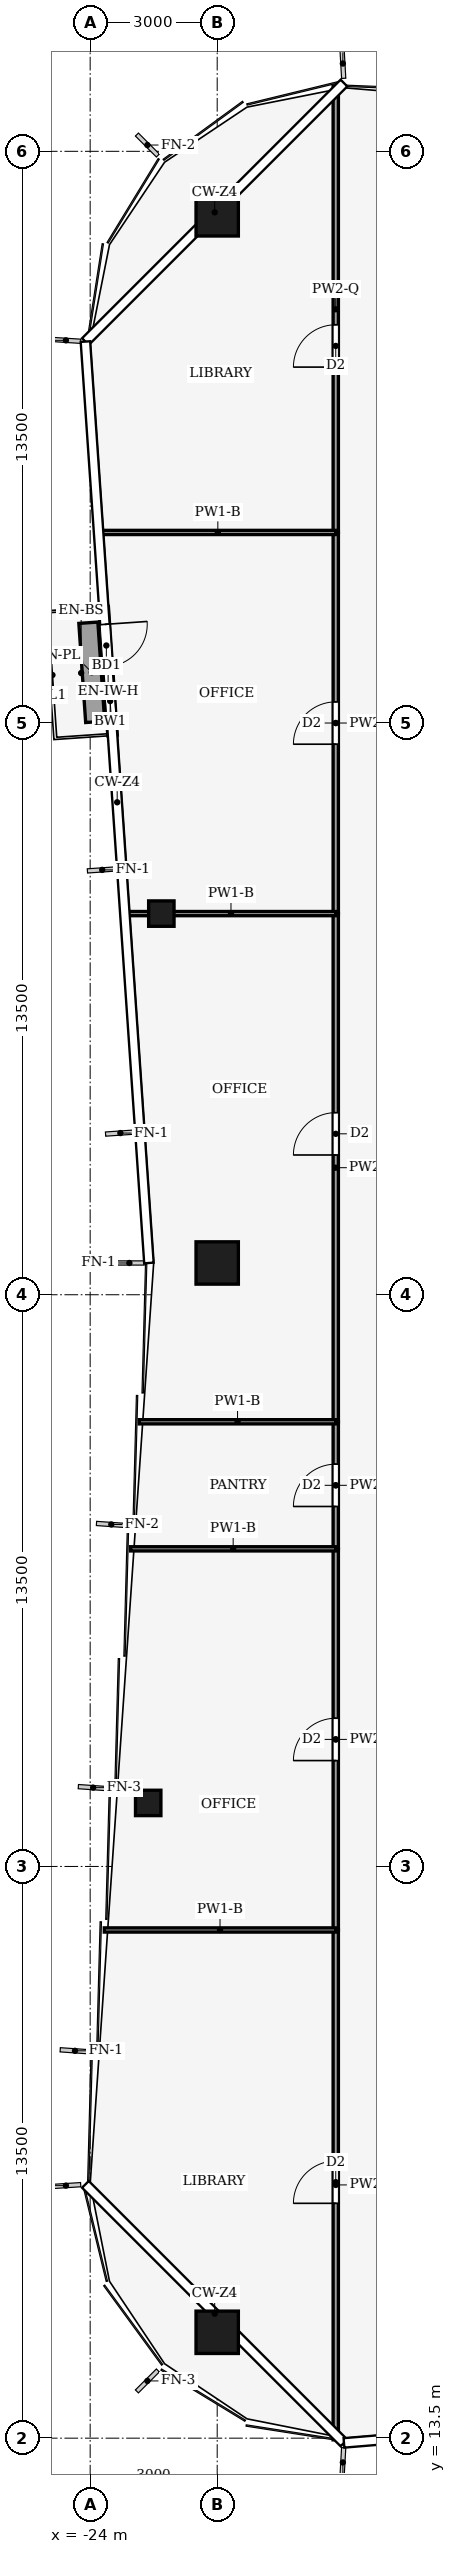
"""IFC4 building model, lengths in metres.
Left out: names, types, materials, properties, quantities, classifications, styles, units other than length and angle.
Written with IfcOpenShell. Run it as: python <this file> out.ifc"""

import sys

from ifc_helpers import new_model, si_unit, direction, frame, frame_2d, origin, origin_2d, place, context, subcontext, project, spatial, rectangle, hollow_rectangle, extrude, element, fill, save


model = new_model("IFC4")
c1 = context("Model", 3, precision=1e-05, world=origin(), true_north=direction((0.0, 1.0)))
c2 = subcontext(c1, "Body", "Model", "MODEL_VIEW")
j1 = project(units=[si_unit("LENGTHUNIT", "METRE"), si_unit("PLANEANGLEUNIT", "RADIAN")], contexts=[c1])
p1 = place(None, origin())
s1 = spatial("IfcSite", under=j1, at=p1, CompositionType="ELEMENT")
p2 = place(p1, origin())
s2 = spatial("IfcBuilding", under=s1, at=p2, CompositionType="ELEMENT")
p3 = place(p2, frame((0.0, 0.0, 233.0)))
s3 = spatial("IfcBuildingStorey", under=s2, at=p3, CompositionType="ELEMENT", Elevation=233.0)
for number, where, z_axis, x_axis in (
    (1, (-21.0, 66.0, 0.0), (0.0, 0.0, 1.0), (1.0, 0.0, 0.0)),
    (2, (-21.0, 16.0, 0.0), (0.0, 0.0, 1.0), (1.0, 0.0, 0.0)),
    (3, (-21.0, 41.25, 0.0), (0.0, 0.0, 1.0), (1.0, 0.0, 0.0)),
):
    element("IfcColumn", number, at=place(p3, frame(where, z_axis=z_axis, x_axis=x_axis)), inside=s3, PredefinedType="COLUMN", context=c2, shape_type="SweptSolid", body=[
        extrude(hollow_rectangle(XDim=1.0, YDim=1.0, WallThickness=0.045, at=origin_2d()), origin(), (0.0, 0.0, 1.0), 5.0),
    ])
for number, where, z_axis, x_axis in (
    (4, (-22.629, 28.5, 0.0), (0.0, 0.0, 1.0), (1.0, 0.0, 0.0)),
    (5, (-22.319, 49.5, 0.0), (0.0, 0.0, 1.0), (1.0, 0.0, 0.0)),
):
    element("IfcColumn", number, at=place(p3, frame(where, z_axis=z_axis, x_axis=x_axis)), inside=s3, PredefinedType="COLUMN", context=c2, shape_type="SweptSolid", body=[
        extrude(hollow_rectangle(XDim=0.6, YDim=0.6, WallThickness=0.025, at=origin_2d()), origin(), (0.0, 0.0, 1.0), 5.0),
    ])
p4 = place(p3, frame((-23.681, 56.744, 0.0), z_axis=(0.0, 0.0, 1.0), x_axis=(0.068837845086, -0.997627862023, 0.0)))
e6 = element("IfcWall", 6, at=p4, inside=s3, PredefinedType="SOLIDWALL", context=c2, shape_type="SweptSolid", body=[
    extrude(rectangle(XDim=3.047, YDim=0.224, at=frame_2d((1.523, 0.0))), origin(), (0.0, 0.0, 1.0), 4.65),
])
p5 = place(p4, frame((0.416, 0.0, 0.0)))
e7 = element("IfcOpeningElement", 7, at=p5, cuts=e6, PredefinedType="OPENING", context=c2, shape_type="SweptSolid", body=[
    extrude(rectangle(XDim=1.0, YDim=2.1, at=frame_2d((0.5, 1.05))), frame((0.0, 0.122, 0.0), z_axis=(0.0, -1.0, 0.0), x_axis=(1.0, 0.0, 0.0)), (0.0, 0.0, 1.0), 0.244),
])
p6 = place(p4, frame((1.831, 0.0, 0.9)))
e8 = element("IfcOpeningElement", 8, at=p6, cuts=e6, PredefinedType="OPENING", context=c2, shape_type="SweptSolid", body=[
    extrude(rectangle(XDim=0.8, YDim=1.2, at=frame_2d((0.4, 0.6))), frame((0.0, 0.122, 0.0), z_axis=(0.0, -1.0, 0.0), x_axis=(1.0, 0.0, 0.0)), (0.0, 0.0, 1.0), 0.244),
])
p7 = place(p3, frame((-24.043, 56.368, 0.0), z_axis=(0.0, 0.0, 1.0), x_axis=(0.068769956374, -0.997632544127, 0.0)))
e9 = element("IfcWall", 9, at=p7, inside=s3, PredefinedType="USERDEFINED", context=c2, shape_type="SweptSolid", body=[
    extrude(rectangle(XDim=2.347, YDim=0.45, at=frame_2d((1.173, 0.0))), origin(), (0.0, 0.0, 1.0), 0.4),
])
p8 = place(p3, frame((-18.2, 13.46, 0.0), z_axis=(0.0, 0.0, 1.0), x_axis=(0.0, 1.0, 0.0)))
e10 = element("IfcWall", 10, at=p8, inside=s3, PredefinedType="PARTITIONING", context=c2, shape_type="SweptSolid", body=[
    extrude(rectangle(XDim=12.04, YDim=0.125, at=frame_2d((6.02, 0.0))), origin(), (0.0, 0.0, 1.0), 3.93),
])
p9 = place(p8, frame((5.586, 0.0, 0.0)))
e11 = element("IfcOpeningElement", 11, at=p9, cuts=e10, PredefinedType="OPENING", context=c2, shape_type="SweptSolid", body=[
    extrude(rectangle(XDim=1.0, YDim=2.1, at=frame_2d((0.5, 1.05))), frame((0.0, 0.073, 0.0), z_axis=(0.0, -1.0, 0.0), x_axis=(1.0, 0.0, 0.0)), (0.0, 0.0, 1.0), 0.145),
])
p10 = place(p3, frame((-18.2, 25.5, 0.0), z_axis=(0.0, 0.0, 1.0), x_axis=(0.0, 1.0, 0.0)))
e12 = element("IfcWall", 12, at=p10, inside=s3, PredefinedType="PARTITIONING", context=c2, shape_type="SweptSolid", body=[
    extrude(rectangle(XDim=9.0, YDim=0.125, at=frame_2d((4.5, 0.0))), origin(), (0.0, 0.0, 1.0), 4.48),
])
p11 = place(p10, frame((4.0, 0.0, 0.0)))
e13 = element("IfcOpeningElement", 13, at=p11, cuts=e12, PredefinedType="OPENING", context=c2, shape_type="SweptSolid", body=[
    extrude(rectangle(XDim=1.0, YDim=2.1, at=frame_2d((0.5, 1.05))), frame((0.0, 0.073, 0.0), z_axis=(0.0, -1.0, 0.0), x_axis=(1.0, 0.0, 0.0)), (0.0, 0.0, 1.0), 0.145),
])
p12 = place(p3, frame((-18.2, 34.5, 0.0), z_axis=(0.0, 0.0, 1.0), x_axis=(0.0, 1.0, 0.0)))
e14 = element("IfcWall", 14, at=p12, inside=s3, PredefinedType="PARTITIONING", context=c2, shape_type="SweptSolid", body=[
    extrude(rectangle(XDim=3.0, YDim=0.125, at=frame_2d((1.5, 0.0))), origin(), (0.0, 0.0, 1.0), 4.48),
])
p13 = place(p12, frame((1.0, 0.0, 0.0)))
e15 = element("IfcOpeningElement", 15, at=p13, cuts=e14, PredefinedType="OPENING", context=c2, shape_type="SweptSolid", body=[
    extrude(rectangle(XDim=1.0, YDim=2.1, at=frame_2d((0.5, 1.05))), frame((0.0, 0.073, 0.0), z_axis=(0.0, -1.0, 0.0), x_axis=(1.0, 0.0, 0.0)), (0.0, 0.0, 1.0), 0.145),
])
p14 = place(p3, frame((-18.2, 37.5, 0.0), z_axis=(0.0, 0.0, 1.0), x_axis=(0.0, 1.0, 0.0)))
e16 = element("IfcWall", 16, at=p14, inside=s3, PredefinedType="PARTITIONING", context=c2, shape_type="SweptSolid", body=[
    extrude(rectangle(XDim=12.0, YDim=0.125, at=frame_2d((6.0, 0.0))), origin(), (0.0, 0.0, 1.0), 4.14),
])
p15 = place(p14, frame((6.3, 0.0, 0.0)))
e17 = element("IfcOpeningElement", 17, at=p15, cuts=e16, PredefinedType="OPENING", context=c2, shape_type="SweptSolid", body=[
    extrude(rectangle(XDim=1.0, YDim=2.1, at=frame_2d((0.5, 1.05))), frame((0.0, 0.073, 0.0), z_axis=(0.0, -1.0, 0.0), x_axis=(1.0, 0.0, 0.0)), (0.0, 0.0, 1.0), 0.145),
])
p16 = place(p3, frame((-18.2, 49.5, 0.0), z_axis=(0.0, 0.0, 1.0), x_axis=(0.0, 1.0, 0.0)))
e18 = element("IfcWall", 18, at=p16, inside=s3, PredefinedType="PARTITIONING", context=c2, shape_type="SweptSolid", body=[
    extrude(rectangle(XDim=9.0, YDim=0.125, at=frame_2d((4.5, 0.0))), origin(), (0.0, 0.0, 1.0), 4.24),
])
p17 = place(p16, frame((4.0, 0.0, 0.0)))
e19 = element("IfcOpeningElement", 19, at=p17, cuts=e18, PredefinedType="OPENING", context=c2, shape_type="SweptSolid", body=[
    extrude(rectangle(XDim=1.0, YDim=2.1, at=frame_2d((0.5, 1.05))), frame((0.0, 0.073, 0.0), z_axis=(0.0, -1.0, 0.0), x_axis=(1.0, 0.0, 0.0)), (0.0, 0.0, 1.0), 0.145),
])
p18 = place(p3, frame((-18.2, 58.5, 0.0), z_axis=(0.0, 0.0, 1.0), x_axis=(0.0, 1.0, 0.0)))
e20 = element("IfcWall", 20, at=p18, inside=s3, PredefinedType="PARTITIONING", context=c2, shape_type="SweptSolid", body=[
    extrude(rectangle(XDim=10.54, YDim=0.125, at=frame_2d((5.27, 0.0))), origin(), (0.0, 0.0, 1.0), 3.93),
])
p19 = place(p18, frame((3.905, 0.0, 0.0)))
e21 = element("IfcOpeningElement", 21, at=p19, cuts=e20, PredefinedType="OPENING", context=c2, shape_type="SweptSolid", body=[
    extrude(rectangle(XDim=1.0, YDim=2.1, at=frame_2d((0.5, 1.05))), frame((0.0, 0.073, 0.0), z_axis=(0.0, -1.0, 0.0), x_axis=(1.0, 0.0, 0.0)), (0.0, 0.0, 1.0), 0.145),
])
p20 = place(p3, frame((-18.2, 25.5, 0.0), z_axis=(0.0, 0.0, 1.0), x_axis=(-1.0, 0.0, 0.0)))
e22 = element("IfcWall", 22, at=p20, inside=s3, PredefinedType="PARTITIONING", context=c2, shape_type="SweptSolid", body=[
    extrude(rectangle(XDim=5.466, YDim=0.1, at=frame_2d((2.733, 0.0))), origin(), (0.0, 0.0, 1.0), 4.04),
])
p21 = place(p3, frame((-18.2, 34.5, 0.0), z_axis=(0.0, 0.0, 1.0), x_axis=(-1.0, 0.0, 0.0)))
e23 = element("IfcWall", 23, at=p21, inside=s3, PredefinedType="PARTITIONING", context=c2, shape_type="SweptSolid", body=[
    extrude(rectangle(XDim=4.845, YDim=0.1, at=frame_2d((2.423, 0.0))), origin(), (0.0, 0.0, 1.0), 4.04),
])
p22 = place(p3, frame((-18.2, 37.5, 0.0), z_axis=(0.0, 0.0, 1.0), x_axis=(-1.0, 0.0, 0.0)))
e24 = element("IfcWall", 24, at=p22, inside=s3, PredefinedType="PARTITIONING", context=c2, shape_type="SweptSolid", body=[
    extrude(rectangle(XDim=4.639, YDim=0.1, at=frame_2d((2.319, 0.0))), origin(), (0.0, 0.0, 1.0), 4.04),
])
p23 = place(p3, frame((-18.2, 49.5, 0.0), z_axis=(0.0, 0.0, 1.0), x_axis=(-1.0, 0.0, 0.0)))
e25 = element("IfcWall", 25, at=p23, inside=s3, PredefinedType="PARTITIONING", context=c2, shape_type="SweptSolid", body=[
    extrude(rectangle(XDim=4.949, YDim=0.1, at=frame_2d((2.475, 0.0))), origin(), (0.0, 0.0, 1.0), 4.04),
])
p24 = place(p3, frame((-18.2, 58.5, 0.0), z_axis=(0.0, 0.0, 1.0), x_axis=(-1.0, 0.0, 0.0)))
e26 = element("IfcWall", 26, at=p24, inside=s3, PredefinedType="PARTITIONING", context=c2, shape_type="SweptSolid", body=[
    extrude(rectangle(XDim=5.57, YDim=0.1, at=frame_2d((2.785, 0.0))), origin(), (0.0, 0.0, 1.0), 4.04),
])
p25 = place(p5, origin())
e27 = element("IfcDoor", 27, at=p25, inside=s3, OperationType="SINGLE_SWING_LEFT", PredefinedType="DOOR", context=c2, shape_type="SweptSolid", body=[
    extrude(rectangle(XDim=1.0, YDim=2.1, at=frame_2d((0.5, 1.05))), frame((0.0, 0.025, 0.0), z_axis=(0.0, -1.0, 0.0), x_axis=(1.0, 0.0, 0.0)), (0.0, 0.0, 1.0), 0.05),
])
fill(e7, e27)
p26 = place(p6, origin())
e28 = element("IfcWindow", 28, at=p26, inside=s3, PartitioningType="SINGLE_PANEL", PredefinedType="WINDOW", context=c2, shape_type="SweptSolid", body=[
    extrude(rectangle(XDim=0.8, YDim=1.2, at=frame_2d((0.4, 0.6))), frame((0.0, 0.03, 0.0), z_axis=(0.0, -1.0, 0.0), x_axis=(1.0, 0.0, 0.0)), (0.0, 0.0, 1.0), 0.06),
])
fill(e8, e28)
p27 = place(p9, origin())
e29 = element("IfcDoor", 29, at=p27, inside=s3, OperationType="SINGLE_SWING_RIGHT", PredefinedType="DOOR", context=c2, shape_type="SweptSolid", body=[
    extrude(rectangle(XDim=1.0, YDim=2.1, at=frame_2d((0.5, 1.05))), frame((0.0, 0.025, 0.0), z_axis=(0.0, -1.0, 0.0), x_axis=(1.0, 0.0, 0.0)), (0.0, 0.0, 1.0), 0.05),
])
fill(e11, e29)
p28 = place(p11, origin())
e30 = element("IfcDoor", 30, at=p28, inside=s3, OperationType="SINGLE_SWING_RIGHT", PredefinedType="DOOR", context=c2, shape_type="SweptSolid", body=[
    extrude(rectangle(XDim=1.0, YDim=2.1, at=frame_2d((0.5, 1.05))), frame((0.0, 0.025, 0.0), z_axis=(0.0, -1.0, 0.0), x_axis=(1.0, 0.0, 0.0)), (0.0, 0.0, 1.0), 0.05),
])
fill(e13, e30)
p29 = place(p13, origin())
e31 = element("IfcDoor", 31, at=p29, inside=s3, OperationType="SINGLE_SWING_LEFT", PredefinedType="DOOR", context=c2, shape_type="SweptSolid", body=[
    extrude(rectangle(XDim=1.0, YDim=2.1, at=frame_2d((0.5, 1.05))), frame((0.0, 0.025, 0.0), z_axis=(0.0, -1.0, 0.0), x_axis=(1.0, 0.0, 0.0)), (0.0, 0.0, 1.0), 0.05),
])
fill(e15, e31)
p30 = place(p15, origin())
e32 = element("IfcDoor", 32, at=p30, inside=s3, OperationType="SINGLE_SWING_RIGHT", PredefinedType="DOOR", context=c2, shape_type="SweptSolid", body=[
    extrude(rectangle(XDim=1.0, YDim=2.1, at=frame_2d((0.5, 1.05))), frame((0.0, 0.025, 0.0), z_axis=(0.0, -1.0, 0.0), x_axis=(1.0, 0.0, 0.0)), (0.0, 0.0, 1.0), 0.05),
])
fill(e17, e32)
p31 = place(p17, origin())
e33 = element("IfcDoor", 33, at=p31, inside=s3, OperationType="SINGLE_SWING_LEFT", PredefinedType="DOOR", context=c2, shape_type="SweptSolid", body=[
    extrude(rectangle(XDim=1.0, YDim=2.1, at=frame_2d((0.5, 1.05))), frame((0.0, 0.025, 0.0), z_axis=(0.0, -1.0, 0.0), x_axis=(1.0, 0.0, 0.0)), (0.0, 0.0, 1.0), 0.05),
])
fill(e19, e33)
p32 = place(p19, origin())
e34 = element("IfcDoor", 34, at=p32, inside=s3, OperationType="SINGLE_SWING_LEFT", PredefinedType="DOOR", context=c2, shape_type="SweptSolid", body=[
    extrude(rectangle(XDim=1.0, YDim=2.1, at=frame_2d((0.5, 1.05))), frame((0.0, 0.025, 0.0), z_axis=(0.0, -1.0, 0.0), x_axis=(1.0, 0.0, 0.0)), (0.0, 0.0, 1.0), 0.05),
])
fill(e21, e34)
save(model, sys.argv[1])
